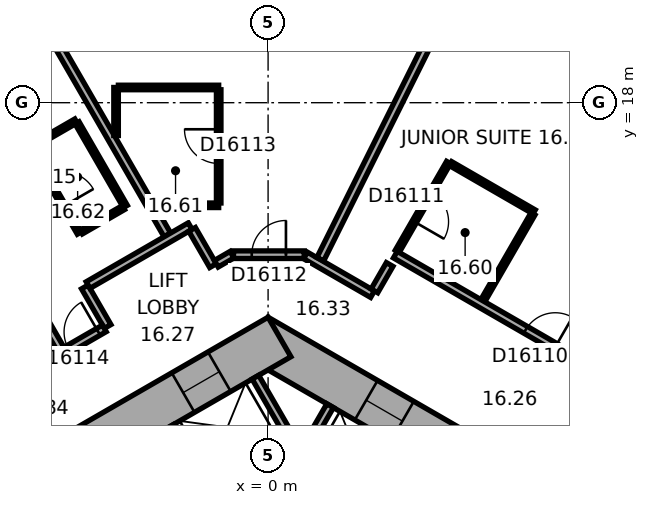
"""IFC4 building model, lengths in metres.
Left out: names, types, materials, properties, quantities, classifications, styles, units other than length and angle.
Written with IfcOpenShell. Run it as: python <this file> out.ifc"""

import sys

from ifc_helpers import new_model, si_unit, direction, frame, frame_2d, origin, place, context, subcontext, project, spatial, rectangle, extrude, element, fill, save


model = new_model("IFC4")
c1 = context("Model", 3, precision=1e-05, world=origin(), true_north=direction((0.0, 1.0)))
c2 = subcontext(c1, "Body", "Model", "MODEL_VIEW")
j1 = project(units=[si_unit("LENGTHUNIT", "METRE"), si_unit("PLANEANGLEUNIT", "RADIAN")], contexts=[c1])
p1 = place(None, origin())
s1 = spatial("IfcSite", under=j1, at=p1, CompositionType="ELEMENT")
p2 = place(p1, origin())
s2 = spatial("IfcBuilding", under=s1, at=p2, CompositionType="ELEMENT")
p3 = place(p2, frame((0.0, 0.0, 73.7)))
s3 = spatial("IfcBuildingStorey", under=s2, at=p3, CompositionType="ELEMENT", Elevation=73.7)
p4 = place(p3, frame((10.4, 5.658, 0.0), z_axis=(0.0, 0.0, 1.0), x_axis=(-0.866021384402, 0.500006961711, 0.0)))
e1 = element("IfcWall", 1, at=p4, inside=s3, PredefinedType="SHEAR", context=c2, shape_type="SweptSolid", body=[
    extrude(rectangle(XDim=12.355, YDim=1.2, at=frame_2d((6.178, 0.0))), origin(), (0.0, 0.0, 1.0), 3.3),
])
p5 = place(p4, frame((2.728, 0.0, 0.0)))
e2 = element("IfcOpeningElement", 2, at=p5, cuts=e1, PredefinedType="OPENING", context=c2, shape_type="SweptSolid", body=[
    extrude(rectangle(XDim=1.1, YDim=2.1, at=frame_2d((0.55, 1.05))), frame((0.0, 0.61, 0.0), z_axis=(0.0, -1.0, 0.0), x_axis=(1.0, 0.0, 0.0)), (0.0, 0.0, 1.0), 1.22),
])
p6 = place(p4, frame((5.328, 0.0, 0.0)))
e3 = element("IfcOpeningElement", 3, at=p6, cuts=e1, PredefinedType="OPENING", context=c2, shape_type="SweptSolid", body=[
    extrude(rectangle(XDim=1.1, YDim=2.1, at=frame_2d((0.55, 1.05))), frame((0.0, 0.61, 0.0), z_axis=(0.0, -1.0, 0.0), x_axis=(1.0, 0.0, 0.0)), (0.0, 0.0, 1.0), 1.22),
])
p7 = place(p4, frame((7.928, 0.0, 0.0)))
e4 = element("IfcOpeningElement", 4, at=p7, cuts=e1, PredefinedType="OPENING", context=c2, shape_type="SweptSolid", body=[
    extrude(rectangle(XDim=1.1, YDim=2.1, at=frame_2d((0.55, 1.05))), frame((0.0, 0.61, 0.0), z_axis=(0.0, -1.0, 0.0), x_axis=(1.0, 0.0, 0.0)), (0.0, 0.0, 1.0), 1.22),
])
p8 = place(p3, frame((0.3, 11.836, 0.0), z_axis=(0.0, 0.0, 1.0), x_axis=(-0.866021384402, -0.500006961711, 0.0)))
e5 = element("IfcWall", 5, at=p8, inside=s3, PredefinedType="SHEAR", context=c2, shape_type="SweptSolid", body=[
    extrude(rectangle(XDim=12.355, YDim=1.2, at=frame_2d((6.178, 0.0))), origin(), (0.0, 0.0, 1.0), 3.3),
])
p9 = place(p8, frame((6.378, 0.0, 0.0)))
e6 = element("IfcOpeningElement", 6, at=p9, cuts=e5, PredefinedType="OPENING", context=c2, shape_type="SweptSolid", body=[
    extrude(rectangle(XDim=1.5, YDim=2.1, at=frame_2d((0.75, 1.05))), frame((0.0, 0.61, 0.0), z_axis=(0.0, -1.0, 0.0), x_axis=(1.0, 0.0, 0.0)), (0.0, 0.0, 1.0), 1.22),
])
p10 = place(p8, frame((1.828, 0.0, 0.0)))
e7 = element("IfcOpeningElement", 7, at=p10, cuts=e5, PredefinedType="OPENING", context=c2, shape_type="SweptSolid", body=[
    extrude(rectangle(XDim=1.1, YDim=2.1, at=frame_2d((0.55, 1.05))), frame((0.0, 0.61, 0.0), z_axis=(0.0, -1.0, 0.0), x_axis=(1.0, 0.0, 0.0)), (0.0, 0.0, 1.0), 1.22),
])
p11 = place(p3, frame((20.63, 15.47, 0.0), z_axis=(0.0, 0.0, 1.0), x_axis=(-0.894934518609, 0.446197498203, 0.0)))
e8 = element("IfcWall", 8, at=p11, inside=s3, PredefinedType="STANDARD", context=c2, shape_type="SweptSolid", body=[
    extrude(rectangle(XDim=21.246, YDim=0.2, at=frame_2d((10.623, 0.0))), origin(), (0.0, 0.0, 1.0), 3.3),
])
p12 = place(p11, frame((1.553, 0.0, 0.8)))
e9 = element("IfcOpeningElement", 9, at=p12, cuts=e8, PredefinedType="OPENING", context=c2, shape_type="SweptSolid", body=[
    extrude(rectangle(XDim=2.4, YDim=1.7, at=frame_2d((1.2, 0.85))), frame((0.0, 0.11, 0.0), z_axis=(0.0, -1.0, 0.0), x_axis=(1.0, 0.0, 0.0)), (0.0, 0.0, 1.0), 0.22),
])
p13 = place(p11, frame((5.488, 0.0, 0.8)))
e10 = element("IfcOpeningElement", 10, at=p13, cuts=e8, PredefinedType="OPENING", context=c2, shape_type="SweptSolid", body=[
    extrude(rectangle(XDim=2.4, YDim=1.7, at=frame_2d((1.2, 0.85))), frame((0.0, 0.11, 0.0), z_axis=(0.0, -1.0, 0.0), x_axis=(1.0, 0.0, 0.0)), (0.0, 0.0, 1.0), 0.22),
])
p14 = place(p11, frame((9.422, 0.0, 0.8)))
e11 = element("IfcOpeningElement", 11, at=p14, cuts=e8, PredefinedType="OPENING", context=c2, shape_type="SweptSolid", body=[
    extrude(rectangle(XDim=2.4, YDim=1.7, at=frame_2d((1.2, 0.85))), frame((0.0, 0.11, 0.0), z_axis=(0.0, -1.0, 0.0), x_axis=(1.0, 0.0, 0.0)), (0.0, 0.0, 1.0), 0.22),
])
p15 = place(p11, frame((13.357, 0.0, 0.8)))
e12 = element("IfcOpeningElement", 12, at=p15, cuts=e8, PredefinedType="OPENING", context=c2, shape_type="SweptSolid", body=[
    extrude(rectangle(XDim=2.4, YDim=1.7, at=frame_2d((1.2, 0.85))), frame((0.0, 0.11, 0.0), z_axis=(0.0, -1.0, 0.0), x_axis=(1.0, 0.0, 0.0)), (0.0, 0.0, 1.0), 0.22),
])
p16 = place(p11, frame((17.292, 0.0, 0.8)))
e13 = element("IfcOpeningElement", 13, at=p16, cuts=e8, PredefinedType="OPENING", context=c2, shape_type="SweptSolid", body=[
    extrude(rectangle(XDim=2.4, YDim=1.7, at=frame_2d((1.2, 0.85))), frame((0.0, 0.11, 0.0), z_axis=(0.0, -1.0, 0.0), x_axis=(1.0, 0.0, 0.0)), (0.0, 0.0, 1.0), 0.22),
])
p17 = place(p3, frame((-3.136, 24.805, 0.0), z_axis=(0.0, 0.0, 1.0), x_axis=(-0.866028291626, -0.499994998079, 0.0)))
e14 = element("IfcWall", 14, at=p17, inside=s3, PredefinedType="STANDARD", context=c2, shape_type="SweptSolid", body=[
    extrude(rectangle(XDim=21.246, YDim=0.2, at=frame_2d((10.623, 0.0))), origin(), (0.0, 0.0, 1.0), 3.3),
])
p18 = place(p17, frame((1.555, 0.0, 0.8)))
e15 = element("IfcOpeningElement", 15, at=p18, cuts=e14, PredefinedType="OPENING", context=c2, shape_type="SweptSolid", body=[
    extrude(rectangle(XDim=2.4, YDim=1.7, at=frame_2d((1.2, 0.85))), frame((0.0, 0.11, 0.0), z_axis=(0.0, -1.0, 0.0), x_axis=(1.0, 0.0, 0.0)), (0.0, 0.0, 1.0), 0.22),
])
p19 = place(p17, frame((5.489, 0.0, 0.8)))
e16 = element("IfcOpeningElement", 16, at=p19, cuts=e14, PredefinedType="OPENING", context=c2, shape_type="SweptSolid", body=[
    extrude(rectangle(XDim=2.4, YDim=1.7, at=frame_2d((1.2, 0.85))), frame((0.0, 0.11, 0.0), z_axis=(0.0, -1.0, 0.0), x_axis=(1.0, 0.0, 0.0)), (0.0, 0.0, 1.0), 0.22),
])
p20 = place(p17, frame((9.424, 0.0, 0.8)))
e17 = element("IfcOpeningElement", 17, at=p20, cuts=e14, PredefinedType="OPENING", context=c2, shape_type="SweptSolid", body=[
    extrude(rectangle(XDim=2.4, YDim=1.7, at=frame_2d((1.2, 0.85))), frame((0.0, 0.11, 0.0), z_axis=(0.0, -1.0, 0.0), x_axis=(1.0, 0.0, 0.0)), (0.0, 0.0, 1.0), 0.22),
])
p21 = place(p17, frame((13.358, 0.0, 0.8)))
e18 = element("IfcOpeningElement", 18, at=p21, cuts=e14, PredefinedType="OPENING", context=c2, shape_type="SweptSolid", body=[
    extrude(rectangle(XDim=2.4, YDim=1.7, at=frame_2d((1.2, 0.85))), frame((0.0, 0.11, 0.0), z_axis=(0.0, -1.0, 0.0), x_axis=(1.0, 0.0, 0.0)), (0.0, 0.0, 1.0), 0.22),
])
p22 = place(p17, frame((17.293, 0.0, 0.8)))
e19 = element("IfcOpeningElement", 19, at=p22, cuts=e14, PredefinedType="OPENING", context=c2, shape_type="SweptSolid", body=[
    extrude(rectangle(XDim=2.4, YDim=1.7, at=frame_2d((1.2, 0.85))), frame((0.0, 0.11, 0.0), z_axis=(0.0, -1.0, 0.0), x_axis=(1.0, 0.0, 0.0)), (0.0, 0.0, 1.0), 0.22),
])
p23 = place(p3, frame((0.532, 8.122, 0.0), z_axis=(0.0, 0.0, 1.0), x_axis=(0.500077893725, 0.86598042715, 0.0)))
e20 = element("IfcWall", 20, at=p23, inside=s3, PredefinedType="PARTITIONING", context=c2, shape_type="SweptSolid", body=[
    extrude(rectangle(XDim=2.2, YDim=0.2, at=frame_2d((1.1, 0.0))), origin(), (0.0, 0.0, 1.0), 2.95),
])
p24 = place(p3, frame((0.767, 8.872, 0.0), z_axis=(0.0, 0.0, 1.0), x_axis=(-0.499994660107, 0.866028486751, 0.0)))
e21 = element("IfcWall", 21, at=p24, inside=s3, PredefinedType="PARTITIONING", context=c2, shape_type="SweptSolid", body=[
    extrude(rectangle(XDim=2.2, YDim=0.2, at=frame_2d((1.1, 0.0))), origin(), (0.0, 0.0, 1.0), 2.95),
])
p25 = place(p3, frame((-1.485, 7.572, 0.0), z_axis=(0.0, 0.0, 1.0), x_axis=(-0.50002983664, 0.866008176907, 0.0)))
e22 = element("IfcWall", 22, at=p25, inside=s3, PredefinedType="PARTITIONING", context=c2, shape_type="SweptSolid", body=[
    extrude(rectangle(XDim=2.2, YDim=0.2, at=frame_2d((1.1, 0.0))), origin(), (0.0, 0.0, 1.0), 2.95),
])
p26 = place(p3, frame((-10.083, 19.524, 0.0), z_axis=(0.0, 0.0, 1.0), x_axis=(0.499999662836, -0.866025598446, 0.0)))
e23 = element("IfcWall", 23, at=p26, inside=s3, PredefinedType="PARTITIONING", context=c2, shape_type="SweptSolid", body=[
    extrude(rectangle(XDim=9.25, YDim=0.2, at=frame_2d((4.625, 0.0))), origin(), (0.0, 0.0, 1.0), 2.15),
])
p27 = place(p3, frame((-6.676, 21.492, 0.0), z_axis=(0.0, 0.0, 1.0), x_axis=(0.500011263043, -0.866018900966, 0.0)))
e24 = element("IfcWall", 24, at=p27, inside=s3, PredefinedType="PARTITIONING", context=c2, shape_type="SweptSolid", body=[
    extrude(rectangle(XDim=8.049, YDim=0.2, at=frame_2d((4.024, 0.0))), origin(), (0.0, 0.0, 1.0), 2.95),
])
p28 = place(p3, frame((-6.268, 16.82, 0.0), z_axis=(0.0, 0.0, 1.0), x_axis=(0.866002662425, 0.500039387122, 0.0)))
e25 = element("IfcWall", 25, at=p28, inside=s3, PredefinedType="PARTITIONING", context=c2, shape_type="SweptSolid", body=[
    extrude(rectangle(XDim=1.4, YDim=0.12, at=frame_2d((0.7, 0.0))), origin(), (0.0, 0.0, 1.0), 2.95),
])
p29 = place(p3, frame((-5.026, 17.469, 0.0), z_axis=(0.0, 0.0, 1.0), x_axis=(0.500005339912, -0.866022320763, 0.0)))
e26 = element("IfcWall", 26, at=p29, inside=s3, PredefinedType="PARTITIONING", context=c2, shape_type="SweptSolid", body=[
    extrude(rectangle(XDim=2.54, YDim=0.12, at=frame_2d((1.27, 0.0))), origin(), (0.0, 0.0, 1.0), 2.95),
])
p30 = place(p3, frame((-4.968, 14.569, 0.0), z_axis=(0.0, 0.0, 1.0), x_axis=(-0.500046963369, 0.865998287773, 0.0)))
e27 = element("IfcWall", 27, at=p30, inside=s3, PredefinedType="PARTITIONING", context=c2, shape_type="SweptSolid", body=[
    extrude(rectangle(XDim=2.54, YDim=0.12, at=frame_2d((1.27, 0.0))), origin(), (0.0, 0.0, 1.0), 2.95),
])
p31 = place(p30, frame((0.82, 0.0, 0.0)))
e28 = element("IfcOpeningElement", 28, at=p31, cuts=e27, PredefinedType="OPENING", context=c2, shape_type="SweptSolid", body=[
    extrude(rectangle(XDim=0.9, YDim=2.1, at=frame_2d((0.45, 1.05))), frame((0.0, 0.07, 0.0), z_axis=(0.0, -1.0, 0.0), x_axis=(1.0, 0.0, 0.0)), (0.0, 0.0, 1.0), 0.14),
])
p32 = place(p3, frame((-4.823, 13.152, 0.0), z_axis=(0.0, 0.0, 1.0), x_axis=(0.499986357472, -0.866033280158, 0.0)))
e29 = element("IfcWall", 29, at=p32, inside=s3, PredefinedType="PARTITIONING", context=c2, shape_type="SweptSolid", body=[
    extrude(rectangle(XDim=1.201, YDim=0.2, at=frame_2d((0.601, 0.0))), origin(), (0.0, 0.0, 1.0), 2.95),
])
p33 = place(p3, frame((-4.309, 12.061, 0.0), z_axis=(0.0, 0.0, 1.0), x_axis=(-0.866020679205, -0.500008183122, 0.0)))
e30 = element("IfcWall", 30, at=p33, inside=s3, PredefinedType="PARTITIONING", context=c2, shape_type="SweptSolid", body=[
    extrude(rectangle(XDim=5.104, YDim=0.2, at=frame_2d((2.552, 0.0))), origin(), (0.0, 0.0, 1.0), 2.95),
])
p34 = place(p33, frame((0.185, 0.0, 0.0)))
e31 = element("IfcOpeningElement", 31, at=p34, cuts=e30, PredefinedType="OPENING", context=c2, shape_type="SweptSolid", body=[
    extrude(rectangle(XDim=0.9, YDim=2.1, at=frame_2d((0.45, 1.05))), frame((0.0, 0.11, 0.0), z_axis=(0.0, -1.0, 0.0), x_axis=(1.0, 0.0, 0.0)), (0.0, 0.0, 1.0), 0.22),
])
p35 = place(p33, frame((3.979, 0.0, 0.0)))
e32 = element("IfcOpeningElement", 32, at=p35, cuts=e30, PredefinedType="OPENING", context=c2, shape_type="SweptSolid", body=[
    extrude(rectangle(XDim=0.9, YDim=2.1, at=frame_2d((0.45, 1.05))), frame((0.0, 0.11, 0.0), z_axis=(0.0, -1.0, 0.0), x_axis=(1.0, 0.0, 0.0)), (0.0, 0.0, 1.0), 0.22),
])
p36 = place(p3, frame((-4.0, 17.137, 0.0), z_axis=(0.0, 0.0, 1.0), x_axis=(0.0, 1.0, 0.0)))
e33 = element("IfcWall", 33, at=p36, inside=s3, PredefinedType="PARTITIONING", context=c2, shape_type="SweptSolid", body=[
    extrude(rectangle(XDim=1.263, YDim=0.12, at=frame_2d((0.632, 0.0))), origin(), (0.0, 0.0, 1.0), 2.95),
])
p37 = place(p3, frame((-3.94, 18.401, 0.0), z_axis=(0.0, 0.0, 1.0), x_axis=(1.0, 0.0, 0.0)))
e34 = element("IfcWall", 34, at=p37, inside=s3, PredefinedType="PARTITIONING", context=c2, shape_type="SweptSolid", body=[
    extrude(rectangle(XDim=2.64, YDim=0.12, at=frame_2d((1.32, 0.0))), origin(), (0.0, 0.0, 1.0), 2.95),
])
p38 = place(p3, frame((-3.808, 15.239, 0.0), z_axis=(0.0, 0.0, 1.0), x_axis=(-0.866087136806, -0.499893060024, 0.0)))
e35 = element("IfcWall", 35, at=p38, inside=s3, PredefinedType="PARTITIONING", context=c2, shape_type="SweptSolid", body=[
    extrude(rectangle(XDim=1.28, YDim=0.12, at=frame_2d((0.64, 0.0))), origin(), (0.0, 0.0, 1.0), 2.95),
])
p39 = place(p3, frame((-2.05, 14.752, 0.0), z_axis=(0.0, 0.0, 1.0), x_axis=(-0.866030936828, -0.499990416364, 0.0)))
e36 = element("IfcWall", 36, at=p39, inside=s3, PredefinedType="PARTITIONING", context=c2, shape_type="SweptSolid", body=[
    extrude(rectangle(XDim=3.102, YDim=0.2, at=frame_2d((1.551, 0.0))), origin(), (0.0, 0.0, 1.0), 2.95),
])
p40 = place(p3, frame((-1.449, 13.712, 0.0), z_axis=(0.0, 0.0, 1.0), x_axis=(-0.499978356969, 0.866037899034, 0.0)))
e37 = element("IfcWall", 37, at=p40, inside=s3, PredefinedType="PARTITIONING", context=c2, shape_type="SweptSolid", body=[
    extrude(rectangle(XDim=1.101, YDim=0.2, at=frame_2d((0.551, 0.0))), origin(), (0.0, 0.0, 1.0), 2.95),
])
p41 = place(p3, frame((-1.3, 15.301, 0.0), z_axis=(0.0, 0.0, 1.0), x_axis=(-1.0, 0.0, 0.0)))
e38 = element("IfcWall", 38, at=p41, inside=s3, PredefinedType="PARTITIONING", context=c2, shape_type="SweptSolid", body=[
    extrude(rectangle(XDim=1.661, YDim=0.12, at=frame_2d((0.831, 0.0))), origin(), (0.0, 0.0, 1.0), 2.95),
])
p42 = place(p3, frame((-1.3, 18.341, 0.0), z_axis=(0.0, 0.0, 1.0), x_axis=(0.0, -1.0, 0.0)))
e39 = element("IfcWall", 39, at=p42, inside=s3, PredefinedType="PARTITIONING", context=c2, shape_type="SweptSolid", body=[
    extrude(rectangle(XDim=2.98, YDim=0.12, at=frame_2d((1.49, 0.0))), origin(), (0.0, 0.0, 1.0), 2.95),
])
p43 = place(p42, frame((1.04, 0.0, 0.0)))
e40 = element("IfcOpeningElement", 40, at=p43, cuts=e39, PredefinedType="OPENING", context=c2, shape_type="SweptSolid", body=[
    extrude(rectangle(XDim=0.9, YDim=2.1, at=frame_2d((0.45, 1.05))), frame((0.0, 0.07, 0.0), z_axis=(0.0, -1.0, 0.0), x_axis=(1.0, 0.0, 0.0)), (0.0, 0.0, 1.0), 0.14),
])
p44 = place(p3, frame((-0.95, 14.001, 0.0), z_axis=(0.0, 0.0, 1.0), x_axis=(-0.86609177584, -0.499885022602, 0.0)))
e41 = element("IfcWall", 41, at=p44, inside=s3, PredefinedType="PARTITIONING", context=c2, shape_type="SweptSolid", body=[
    extrude(rectangle(XDim=0.477, YDim=0.2, at=frame_2d((0.238, 0.0))), origin(), (0.0, 0.0, 1.0), 2.95),
])
p45 = place(p3, frame((0.95, 14.001, 0.0), z_axis=(0.0, 0.0, 1.0), x_axis=(-1.0, 0.0, 0.0)))
e42 = element("IfcWall", 42, at=p45, inside=s3, PredefinedType="PARTITIONING", context=c2, shape_type="SweptSolid", body=[
    extrude(rectangle(XDim=1.86, YDim=0.2, at=frame_2d((0.93, 0.0))), origin(), (0.0, 0.0, 1.0), 2.95),
])
p46 = place(p45, frame((0.48, 0.0, 0.0)))
e43 = element("IfcOpeningElement", 43, at=p46, cuts=e42, PredefinedType="OPENING", context=c2, shape_type="SweptSolid", body=[
    extrude(rectangle(XDim=0.9, YDim=2.1, at=frame_2d((0.45, 1.05))), frame((0.0, 0.11, 0.0), z_axis=(0.0, -1.0, 0.0), x_axis=(1.0, 0.0, 0.0)), (0.0, 0.0, 1.0), 0.22),
])
p47 = place(p3, frame((2.748, 12.962, 0.0), z_axis=(0.0, 0.0, 1.0), x_axis=(-0.866013897511, 0.50001992892, 0.0)))
e44 = element("IfcWall", 44, at=p47, inside=s3, PredefinedType="PARTITIONING", context=c2, shape_type="SweptSolid", body=[
    extrude(rectangle(XDim=2.037, YDim=0.2, at=frame_2d((1.018, 0.0))), origin(), (0.0, 0.0, 1.0), 2.95),
])
p48 = place(p3, frame((3.199, 13.743, 0.0), z_axis=(0.0, 0.0, 1.0), x_axis=(-0.500170954823, -0.865926680471, 0.0)))
e45 = element("IfcWall", 45, at=p48, inside=s3, PredefinedType="PARTITIONING", context=c2, shape_type="SweptSolid", body=[
    extrude(rectangle(XDim=0.801, YDim=0.2, at=frame_2d((0.4, 0.0))), origin(), (0.0, 0.0, 1.0), 2.95),
])
p49 = place(p3, frame((3.399, 14.089, 0.0), z_axis=(0.0, 0.0, 1.0), x_axis=(0.4999416173, 0.866059108428, 0.0)))
e46 = element("IfcWall", 46, at=p49, inside=s3, PredefinedType="PARTITIONING", context=c2, shape_type="SweptSolid", body=[
    extrude(rectangle(XDim=2.7, YDim=0.12, at=frame_2d((1.35, 0.0))), origin(), (0.0, 0.0, 1.0), 2.95),
])
p50 = place(p49, frame((0.9, 0.0, 0.0)))
e47 = element("IfcOpeningElement", 47, at=p50, cuts=e46, PredefinedType="OPENING", context=c2, shape_type="SweptSolid", body=[
    extrude(rectangle(XDim=0.9, YDim=2.1, at=frame_2d((0.45, 1.05))), frame((0.0, 0.07, 0.0), z_axis=(0.0, -1.0, 0.0), x_axis=(1.0, 0.0, 0.0)), (0.0, 0.0, 1.0), 0.14),
])
p51 = place(p3, frame((4.801, 16.397, 0.0), z_axis=(0.0, 0.0, 1.0), x_axis=(0.866022320763, -0.500005339912, 0.0)))
e48 = element("IfcWall", 48, at=p51, inside=s3, PredefinedType="PARTITIONING", context=c2, shape_type="SweptSolid", body=[
    extrude(rectangle(XDim=2.54, YDim=0.12, at=frame_2d((1.27, 0.0))), origin(), (0.0, 0.0, 1.0), 2.95),
])
p52 = place(p3, frame((5.351, 21.859, 0.0), z_axis=(0.0, 0.0, 1.0), x_axis=(-0.446205309328, -0.894930624086, 0.0)))
e49 = element("IfcWall", 49, at=p52, inside=s3, PredefinedType="PARTITIONING", context=c2, shape_type="SweptSolid", body=[
    extrude(rectangle(XDim=8.913, YDim=0.2, at=frame_2d((4.457, 0.0))), origin(), (0.0, 0.0, 1.0), 2.15),
])
p53 = place(p3, frame((6.971, 15.075, 0.0), z_axis=(0.0, 0.0, 1.0), x_axis=(-0.500007957085, -0.86602080971, 0.0)))
e50 = element("IfcWall", 50, at=p53, inside=s3, PredefinedType="PARTITIONING", context=c2, shape_type="SweptSolid", body=[
    extrude(rectangle(XDim=2.64, YDim=0.12, at=frame_2d((1.32, 0.0))), origin(), (0.0, 0.0, 1.0), 2.95),
])
p54 = place(p3, frame((10.885, 9.652, 0.0), z_axis=(0.0, 0.0, 1.0), x_axis=(-0.866033277307, 0.499986362411, 0.0)))
e51 = element("IfcWall", 51, at=p54, inside=s3, PredefinedType="PARTITIONING", context=c2, shape_type="SweptSolid", body=[
    extrude(rectangle(XDim=8.702, YDim=0.2, at=frame_2d((4.351, 0.0))), origin(), (0.0, 0.0, 1.0), 2.95),
])
p55 = place(p54, frame((3.844, 0.0, 0.0)))
e52 = element("IfcOpeningElement", 52, at=p55, cuts=e51, PredefinedType="OPENING", context=c2, shape_type="SweptSolid", body=[
    extrude(rectangle(XDim=0.9, YDim=2.1, at=frame_2d((0.45, 1.05))), frame((0.0, 0.11, 0.0), z_axis=(0.0, -1.0, 0.0), x_axis=(1.0, 0.0, 0.0)), (0.0, 0.0, 1.0), 0.22),
])
p56 = place(p7, origin())
e53 = element("IfcDoor", 53, at=p56, inside=s3, OperationType="DOUBLE_DOOR_SLIDING", PredefinedType="DOOR", context=c2, shape_type="SweptSolid", body=[
    extrude(rectangle(XDim=1.1, YDim=2.1, at=frame_2d((0.55, 1.05))), frame((0.0, 0.025, 0.0), z_axis=(0.0, -1.0, 0.0), x_axis=(1.0, 0.0, 0.0)), (0.0, 0.0, 1.0), 0.05),
])
fill(e4, e53)
p57 = place(p10, origin())
e54 = element("IfcDoor", 54, at=p57, inside=s3, OperationType="DOUBLE_DOOR_SLIDING", PredefinedType="DOOR", context=c2, shape_type="SweptSolid", body=[
    extrude(rectangle(XDim=1.1, YDim=2.1, at=frame_2d((0.55, 1.05))), frame((0.0, 0.025, 0.0), z_axis=(0.0, -1.0, 0.0), x_axis=(1.0, 0.0, 0.0)), (0.0, 0.0, 1.0), 0.05),
])
fill(e7, e54)
p58 = place(p55, origin())
e55 = element("IfcDoor", 55, at=p58, inside=s3, OperationType="SINGLE_SWING_LEFT", PredefinedType="DOOR", context=c2, shape_type="SweptSolid", body=[
    extrude(rectangle(XDim=0.9, YDim=2.1, at=frame_2d((0.45, 1.05))), frame((0.0, 0.025, 0.0), z_axis=(0.0, -1.0, 0.0), x_axis=(1.0, 0.0, 0.0)), (0.0, 0.0, 1.0), 0.05),
])
fill(e52, e55)
p59 = place(p50, origin())
e56 = element("IfcDoor", 56, at=p59, inside=s3, OperationType="SINGLE_SWING_LEFT", PredefinedType="DOOR", context=c2, shape_type="SweptSolid", body=[
    extrude(rectangle(XDim=0.9, YDim=2.1, at=frame_2d((0.45, 1.05))), frame((0.0, 0.025, 0.0), z_axis=(0.0, -1.0, 0.0), x_axis=(1.0, 0.0, 0.0)), (0.0, 0.0, 1.0), 0.05),
])
fill(e47, e56)
p60 = place(p46, origin())
e57 = element("IfcDoor", 57, at=p60, inside=s3, OperationType="SINGLE_SWING_LEFT", PredefinedType="DOOR", context=c2, shape_type="SweptSolid", body=[
    extrude(rectangle(XDim=0.9, YDim=2.1, at=frame_2d((0.45, 1.05))), frame((0.0, 0.025, 0.0), z_axis=(0.0, -1.0, 0.0), x_axis=(1.0, 0.0, 0.0)), (0.0, 0.0, 1.0), 0.05),
])
fill(e43, e57)
p61 = place(p43, origin())
e58 = element("IfcDoor", 58, at=p61, inside=s3, OperationType="SINGLE_SWING_LEFT", PredefinedType="DOOR", context=c2, shape_type="SweptSolid", body=[
    extrude(rectangle(XDim=0.9, YDim=2.1, at=frame_2d((0.45, 1.05))), frame((0.0, 0.025, 0.0), z_axis=(0.0, -1.0, 0.0), x_axis=(1.0, 0.0, 0.0)), (0.0, 0.0, 1.0), 0.05),
])
fill(e40, e58)
p62 = place(p34, origin())
e59 = element("IfcDoor", 59, at=p62, inside=s3, OperationType="SINGLE_SWING_LEFT", PredefinedType="DOOR", context=c2, shape_type="SweptSolid", body=[
    extrude(rectangle(XDim=0.9, YDim=2.1, at=frame_2d((0.45, 1.05))), frame((0.0, 0.025, 0.0), z_axis=(0.0, -1.0, 0.0), x_axis=(1.0, 0.0, 0.0)), (0.0, 0.0, 1.0), 0.05),
])
fill(e31, e59)
p63 = place(p31, origin())
e60 = element("IfcDoor", 60, at=p63, inside=s3, OperationType="SINGLE_SWING_LEFT", PredefinedType="DOOR", context=c2, shape_type="SweptSolid", body=[
    extrude(rectangle(XDim=0.9, YDim=2.1, at=frame_2d((0.45, 1.05))), frame((0.0, 0.025, 0.0), z_axis=(0.0, -1.0, 0.0), x_axis=(1.0, 0.0, 0.0)), (0.0, 0.0, 1.0), 0.05),
])
fill(e28, e60)
save(model, sys.argv[1])
